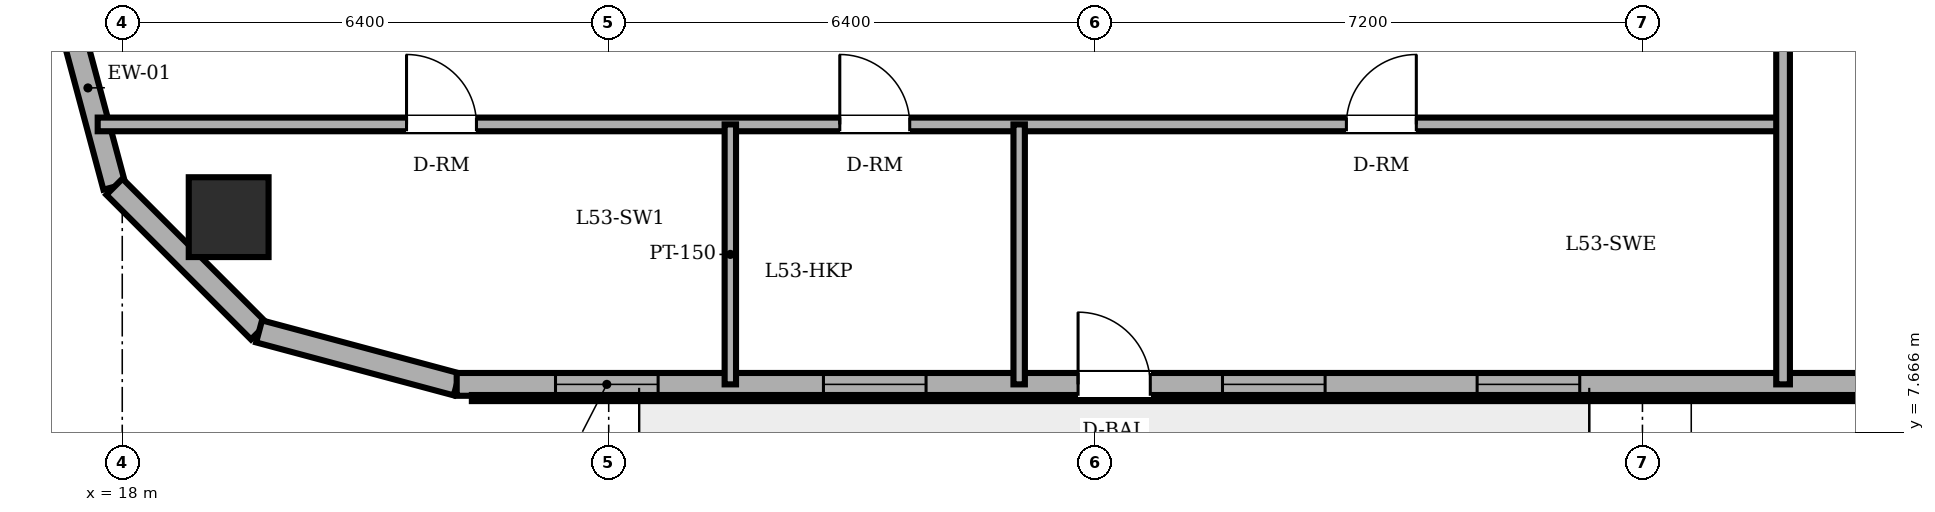
"""IFC4 building model, lengths in metres.
Left out: names, types, materials, properties, quantities, classifications, styles, units other than length and angle.
Written with IfcOpenShell. Run it as: python <this file> out.ifc"""

import sys

from ifc_helpers import new_model, si_unit, direction, frame, frame_2d, origin, origin_2d, place, context, subcontext, project, spatial, rectangle, circle, extrude, element, fill, save


model = new_model("IFC4")
c1 = context("Model", 3, precision=1e-05, world=origin(), true_north=direction((0.0, 1.0)))
c2 = subcontext(c1, "Body", "Model", "MODEL_VIEW")
j1 = project(units=[si_unit("LENGTHUNIT", "METRE"), si_unit("PLANEANGLEUNIT", "RADIAN")], contexts=[c1])
p1 = place(None, origin())
s1 = spatial("IfcSite", under=j1, at=p1, CompositionType="ELEMENT")
p2 = place(p1, origin())
s2 = spatial("IfcBuilding", under=s1, at=p2, CompositionType="ELEMENT")
p3 = place(p2, frame((0.0, 0.0, 204.9)))
s3 = spatial("IfcBuildingStorey", under=s2, at=p3, CompositionType="ELEMENT", Elevation=204.9)
p4 = place(p3, frame((19.4, 10.5, 0.0), z_axis=(0.0, 0.0, 1.0), x_axis=(1.0, 0.0, 0.0)))
e1 = element("IfcColumn", 1, at=p4, inside=s3, PredefinedType="COLUMN", context=c2, shape_type="SweptSolid", body=[
    extrude(circle(Radius=0.525, at=origin_2d()), origin(), (0.0, 0.0, 1.0), 3.6),
])
p5 = place(p3, frame((17.2, 13.5, 0.0), z_axis=(0.0, 0.0, 1.0), x_axis=(0.258932525951, -0.965895412042, 0.0)))
e2 = element("IfcWall", 2, at=p5, inside=s3, PredefinedType="SOLIDWALL", context=c2, shape_type="SweptSolid", body=[
    extrude(rectangle(XDim=2.692, YDim=0.3, at=frame_2d((1.346, 0.0))), origin(), (0.0, 0.0, 1.0), 3.4),
])
p6 = place(p3, frame((17.897, 10.9, 0.0), z_axis=(0.0, 0.0, 1.0), x_axis=(0.707152139074, -0.70706142039, 0.0)))
e3 = element("IfcWall", 3, at=p6, inside=s3, PredefinedType="SOLIDWALL", context=c2, shape_type="SweptSolid", body=[
    extrude(rectangle(XDim=2.691, YDim=0.3, at=frame_2d((1.346, 0.0))), origin(), (0.0, 0.0, 1.0), 3.4),
])
p7 = place(p3, frame((19.8, 8.997, 0.0), z_axis=(0.0, 0.0, 1.0), x_axis=(0.965889330541, -0.258955210695, 0.0)))
e4 = element("IfcWall", 4, at=p7, inside=s3, PredefinedType="SOLIDWALL", context=c2, shape_type="SweptSolid", body=[
    extrude(rectangle(XDim=2.692, YDim=0.3, at=frame_2d((1.346, 0.0))), origin(), (0.0, 0.0, 1.0), 3.4),
])
p8 = place(p3, frame((22.4, 8.3, 0.0), z_axis=(0.0, 0.0, 1.0), x_axis=(1.0, 0.0, 0.0)))
e5 = element("IfcWall", 5, at=p8, inside=s3, PredefinedType="SOLIDWALL", context=c2, shape_type="SweptSolid", body=[
    extrude(rectangle(XDim=32.485, YDim=0.3, at=frame_2d((16.243, 0.0))), origin(), (0.0, 0.0, 1.0), 3.4),
])
p9 = place(p8, frame((8.175, 0.0, 0.0)))
e6 = element("IfcOpeningElement", 6, at=p9, cuts=e5, PredefinedType="OPENING", context=c2, shape_type="SweptSolid", body=[
    extrude(rectangle(XDim=0.95, YDim=2.2, at=frame_2d((0.475, 1.1))), frame((0.0, 0.16, 0.0), z_axis=(0.0, -1.0, 0.0), x_axis=(1.0, 0.0, 0.0)), (0.0, 0.0, 1.0), 0.32),
])
p10 = place(p8, frame((1.3, 0.0, 0.85)))
e7 = element("IfcOpeningElement", 7, at=p10, cuts=e5, PredefinedType="OPENING", context=c2, shape_type="SweptSolid", body=[
    extrude(rectangle(XDim=1.35, YDim=1.55, at=frame_2d((0.675, 0.775))), frame((0.0, 0.16, 0.0), z_axis=(0.0, -1.0, 0.0), x_axis=(1.0, 0.0, 0.0)), (0.0, 0.0, 1.0), 0.32),
])
p11 = place(p8, frame((4.825, 0.0, 0.85)))
e8 = element("IfcOpeningElement", 8, at=p11, cuts=e5, PredefinedType="OPENING", context=c2, shape_type="SweptSolid", body=[
    extrude(rectangle(XDim=1.35, YDim=1.55, at=frame_2d((0.675, 0.775))), frame((0.0, 0.16, 0.0), z_axis=(0.0, -1.0, 0.0), x_axis=(1.0, 0.0, 0.0)), (0.0, 0.0, 1.0), 0.32),
])
p12 = place(p8, frame((10.075, 0.0, 0.85)))
e9 = element("IfcOpeningElement", 9, at=p12, cuts=e5, PredefinedType="OPENING", context=c2, shape_type="SweptSolid", body=[
    extrude(rectangle(XDim=1.35, YDim=1.55, at=frame_2d((0.675, 0.775))), frame((0.0, 0.16, 0.0), z_axis=(0.0, -1.0, 0.0), x_axis=(1.0, 0.0, 0.0)), (0.0, 0.0, 1.0), 0.32),
])
p13 = place(p8, frame((13.425, 0.0, 0.85)))
e10 = element("IfcOpeningElement", 10, at=p13, cuts=e5, PredefinedType="OPENING", context=c2, shape_type="SweptSolid", body=[
    extrude(rectangle(XDim=1.35, YDim=1.55, at=frame_2d((0.675, 0.775))), frame((0.0, 0.16, 0.0), z_axis=(0.0, -1.0, 0.0), x_axis=(1.0, 0.0, 0.0)), (0.0, 0.0, 1.0), 0.32),
])
p14 = place(p8, frame((19.386, 0.0, 0.85)))
e11 = element("IfcOpeningElement", 11, at=p14, cuts=e5, PredefinedType="OPENING", context=c2, shape_type="SweptSolid", body=[
    extrude(rectangle(XDim=1.35, YDim=1.55, at=frame_2d((0.675, 0.775))), frame((0.0, 0.16, 0.0), z_axis=(0.0, -1.0, 0.0), x_axis=(1.0, 0.0, 0.0)), (0.0, 0.0, 1.0), 0.32),
])
p15 = place(p8, frame((21.996, 0.0, 0.85)))
e12 = element("IfcOpeningElement", 12, at=p15, cuts=e5, PredefinedType="OPENING", context=c2, shape_type="SweptSolid", body=[
    extrude(rectangle(XDim=1.35, YDim=1.55, at=frame_2d((0.675, 0.775))), frame((0.0, 0.16, 0.0), z_axis=(0.0, -1.0, 0.0), x_axis=(1.0, 0.0, 0.0)), (0.0, 0.0, 1.0), 0.32),
])
p16 = place(p8, frame((26.891, 0.0, 0.85)))
e13 = element("IfcOpeningElement", 13, at=p16, cuts=e5, PredefinedType="OPENING", context=c2, shape_type="SweptSolid", body=[
    extrude(rectangle(XDim=1.35, YDim=1.55, at=frame_2d((0.675, 0.775))), frame((0.0, 0.16, 0.0), z_axis=(0.0, -1.0, 0.0), x_axis=(1.0, 0.0, 0.0)), (0.0, 0.0, 1.0), 0.32),
])
p17 = place(p8, frame((29.176, 0.0, 0.85)))
e14 = element("IfcOpeningElement", 14, at=p17, cuts=e5, PredefinedType="OPENING", context=c2, shape_type="SweptSolid", body=[
    extrude(rectangle(XDim=1.35, YDim=1.55, at=frame_2d((0.675, 0.775))), frame((0.0, 0.16, 0.0), z_axis=(0.0, -1.0, 0.0), x_axis=(1.0, 0.0, 0.0)), (0.0, 0.0, 1.0), 0.32),
])
p18 = place(p3, frame((17.677, 11.72, 0.0), z_axis=(0.0, 0.0, 1.0), x_axis=(1.0, 0.0, 0.0)))
e15 = element("IfcWall", 15, at=p18, inside=s3, PredefinedType="PARTITIONING", context=c2, shape_type="SweptSolid", body=[
    extrude(rectangle(XDim=22.173, YDim=0.18, at=frame_2d((11.086, 0.0))), origin(), (0.0, 0.0, 1.0), 3.4),
])
p19 = place(p18, frame((9.763, 0.0, 0.0)))
e16 = element("IfcOpeningElement", 16, at=p19, cuts=e15, PredefinedType="OPENING", context=c2, shape_type="SweptSolid", body=[
    extrude(rectangle(XDim=0.92, YDim=2.1, at=frame_2d((0.46, 1.05))), frame((0.0, 0.1, 0.0), z_axis=(0.0, -1.0, 0.0), x_axis=(1.0, 0.0, 0.0)), (0.0, 0.0, 1.0), 0.2),
])
p20 = place(p18, frame((4.063, 0.0, 0.0)))
e17 = element("IfcOpeningElement", 17, at=p20, cuts=e15, PredefinedType="OPENING", context=c2, shape_type="SweptSolid", body=[
    extrude(rectangle(XDim=0.92, YDim=2.1, at=frame_2d((0.46, 1.05))), frame((0.0, 0.1, 0.0), z_axis=(0.0, -1.0, 0.0), x_axis=(1.0, 0.0, 0.0)), (0.0, 0.0, 1.0), 0.2),
])
p21 = place(p18, frame((16.428, 0.0, 0.0)))
e18 = element("IfcOpeningElement", 18, at=p21, cuts=e15, PredefinedType="OPENING", context=c2, shape_type="SweptSolid", body=[
    extrude(rectangle(XDim=0.92, YDim=2.1, at=frame_2d((0.46, 1.05))), frame((0.0, 0.1, 0.0), z_axis=(0.0, -1.0, 0.0), x_axis=(1.0, 0.0, 0.0)), (0.0, 0.0, 1.0), 0.2),
])
for number, where, z_axis, x_axis in (
    (19, (26.0, 8.3, 0.0), (0.0, 0.0, 1.0), (0.0, 1.0, 0.0)),
    (20, (29.8, 8.3, 0.0), (0.0, 0.0, 1.0), (0.0, 1.0, 0.0)),
):
    element("IfcWall", number, at=place(p3, frame(where, z_axis=z_axis, x_axis=x_axis)), inside=s3, PredefinedType="PARTITIONING", context=c2, shape_type="SweptSolid", body=[
        extrude(rectangle(XDim=3.42, YDim=0.15, at=frame_2d((1.71, 0.0))), origin(), (0.0, 0.0, 1.0), 3.4),
    ])
p22 = place(p3, frame((39.85, 8.3, 0.0), z_axis=(0.0, 0.0, 1.0), x_axis=(0.0, 1.0, 0.0)))
e21 = element("IfcWall", 21, at=p22, inside=s3, PredefinedType="PARTITIONING", context=c2, shape_type="SweptSolid", body=[
    extrude(rectangle(XDim=14.52, YDim=0.18, at=frame_2d((7.26, 0.0))), origin(), (0.0, 0.0, 1.0), 3.4),
])
p23 = place(p22, frame((8.25, 0.0, 0.0)))
e22 = element("IfcOpeningElement", 22, at=p23, cuts=e21, PredefinedType="OPENING", context=c2, shape_type="SweptSolid", body=[
    extrude(rectangle(XDim=0.92, YDim=2.1, at=frame_2d((0.46, 1.05))), frame((0.0, 0.1, 0.0), z_axis=(0.0, -1.0, 0.0), x_axis=(1.0, 0.0, 0.0)), (0.0, 0.0, 1.0), 0.2),
])
p24 = place(p9, origin())
e23 = element("IfcDoor", 23, at=p24, inside=s3, OperationType="SINGLE_SWING_LEFT", PredefinedType="DOOR", context=c2, shape_type="SweptSolid", body=[
    extrude(rectangle(XDim=0.95, YDim=2.2, at=frame_2d((0.475, 1.1))), frame((0.0, 0.025, 0.0), z_axis=(0.0, -1.0, 0.0), x_axis=(1.0, 0.0, 0.0)), (0.0, 0.0, 1.0), 0.05),
])
fill(e6, e23)
p25 = place(p10, origin())
e24 = element("IfcWindow", 24, at=p25, inside=s3, PartitioningType="SINGLE_PANEL", PredefinedType="WINDOW", context=c2, shape_type="SweptSolid", body=[
    extrude(rectangle(XDim=1.35, YDim=1.55, at=frame_2d((0.675, 0.775))), frame((0.0, 0.03, 0.0), z_axis=(0.0, -1.0, 0.0), x_axis=(1.0, 0.0, 0.0)), (0.0, 0.0, 1.0), 0.06),
])
fill(e7, e24)
p26 = place(p11, origin())
e25 = element("IfcWindow", 25, at=p26, inside=s3, PartitioningType="SINGLE_PANEL", PredefinedType="WINDOW", context=c2, shape_type="SweptSolid", body=[
    extrude(rectangle(XDim=1.35, YDim=1.55, at=frame_2d((0.675, 0.775))), frame((0.0, 0.03, 0.0), z_axis=(0.0, -1.0, 0.0), x_axis=(1.0, 0.0, 0.0)), (0.0, 0.0, 1.0), 0.06),
])
fill(e8, e25)
p27 = place(p12, origin())
e26 = element("IfcWindow", 26, at=p27, inside=s3, PartitioningType="SINGLE_PANEL", PredefinedType="WINDOW", context=c2, shape_type="SweptSolid", body=[
    extrude(rectangle(XDim=1.35, YDim=1.55, at=frame_2d((0.675, 0.775))), frame((0.0, 0.03, 0.0), z_axis=(0.0, -1.0, 0.0), x_axis=(1.0, 0.0, 0.0)), (0.0, 0.0, 1.0), 0.06),
])
fill(e9, e26)
p28 = place(p13, origin())
e27 = element("IfcWindow", 27, at=p28, inside=s3, PartitioningType="SINGLE_PANEL", PredefinedType="WINDOW", context=c2, shape_type="SweptSolid", body=[
    extrude(rectangle(XDim=1.35, YDim=1.55, at=frame_2d((0.675, 0.775))), frame((0.0, 0.03, 0.0), z_axis=(0.0, -1.0, 0.0), x_axis=(1.0, 0.0, 0.0)), (0.0, 0.0, 1.0), 0.06),
])
fill(e10, e27)
p29 = place(p19, origin())
e28 = element("IfcDoor", 28, at=p29, inside=s3, OperationType="SINGLE_SWING_LEFT", PredefinedType="DOOR", context=c2, shape_type="SweptSolid", body=[
    extrude(rectangle(XDim=0.92, YDim=2.1, at=frame_2d((0.46, 1.05))), frame((0.0, 0.025, 0.0), z_axis=(0.0, -1.0, 0.0), x_axis=(1.0, 0.0, 0.0)), (0.0, 0.0, 1.0), 0.05),
])
fill(e16, e28)
p30 = place(p20, origin())
e29 = element("IfcDoor", 29, at=p30, inside=s3, OperationType="SINGLE_SWING_LEFT", PredefinedType="DOOR", context=c2, shape_type="SweptSolid", body=[
    extrude(rectangle(XDim=0.92, YDim=2.1, at=frame_2d((0.46, 1.05))), frame((0.0, 0.025, 0.0), z_axis=(0.0, -1.0, 0.0), x_axis=(1.0, 0.0, 0.0)), (0.0, 0.0, 1.0), 0.05),
])
fill(e17, e29)
p31 = place(p21, origin())
e30 = element("IfcDoor", 30, at=p31, inside=s3, OperationType="SINGLE_SWING_RIGHT", PredefinedType="DOOR", context=c2, shape_type="SweptSolid", body=[
    extrude(rectangle(XDim=0.92, YDim=2.1, at=frame_2d((0.46, 1.05))), frame((0.0, 0.025, 0.0), z_axis=(0.0, -1.0, 0.0), x_axis=(1.0, 0.0, 0.0)), (0.0, 0.0, 1.0), 0.05),
])
fill(e18, e30)
save(model, sys.argv[1])
